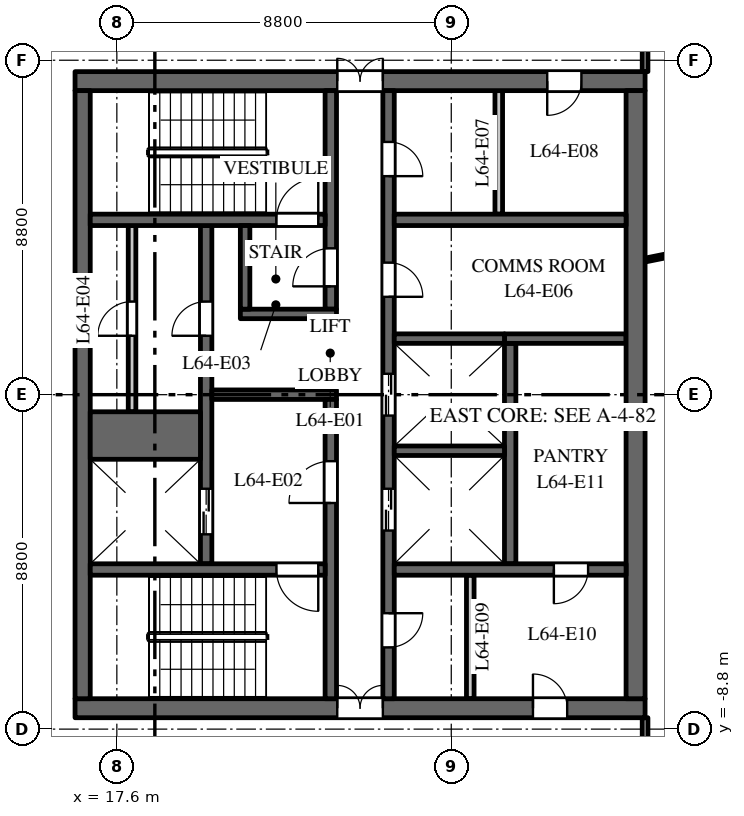
"""IFC4 building model, lengths in metres.
Left out: names, types, materials, properties, quantities, classifications, styles, units other than length and angle.
Written with IfcOpenShell. Run it as: python <this file> out.ifc"""

import sys

from ifc_helpers import new_model, si_unit, direction, frame, frame_2d, origin, place, context, subcontext, project, spatial, rectangle, extrude, element, fill, save


model = new_model("IFC4")
c1 = context("Model", 3, precision=1e-05, world=origin(), true_north=direction((0.0, 1.0)))
c2 = subcontext(c1, "Body", "Model", "MODEL_VIEW")
j1 = project(units=[si_unit("LENGTHUNIT", "METRE"), si_unit("PLANEANGLEUNIT", "RADIAN")], contexts=[c1])
p1 = place(None, origin())
s1 = spatial("IfcSite", under=j1, at=p1, CompositionType="ELEMENT")
p2 = place(p1, origin())
s2 = spatial("IfcBuilding", under=s1, at=p2, CompositionType="ELEMENT")
p3 = place(p2, frame((0.0, 0.0, 299.0)))
s3 = spatial("IfcBuildingStorey", under=s2, at=p3, CompositionType="ELEMENT", Elevation=299.0)
p4 = place(p3, frame((16.5, 8.25, 0.0), z_axis=(0.0, 0.0, 1.0), x_axis=(1.0, 0.0, 0.0)))
e1 = element("IfcWall", 1, at=p4, inside=s3, PredefinedType="SHEAR", context=c2, shape_type="SweptSolid", body=[
    extrude(rectangle(XDim=15.0, YDim=0.5, at=frame_2d((7.5, 0.0))), origin(), (0.0, 0.0, 1.0), 3.7),
])
p5 = place(p4, frame((6.9, 0.0, 0.0)))
e2 = element("IfcOpeningElement", 2, at=p5, cuts=e1, PredefinedType="OPENING", context=c2, shape_type="SweptSolid", body=[
    extrude(rectangle(XDim=1.2, YDim=2.1, at=frame_2d((0.6, 1.05))), frame((0.0, 0.26, 0.0), z_axis=(0.0, -1.0, 0.0), x_axis=(1.0, 0.0, 0.0)), (0.0, 0.0, 1.0), 0.52),
])
p6 = place(p4, frame((12.425, 0.0, 0.0)))
e3 = element("IfcOpeningElement", 3, at=p6, cuts=e1, PredefinedType="OPENING", context=c2, shape_type="SweptSolid", body=[
    extrude(rectangle(XDim=0.9, YDim=2.1, at=frame_2d((0.45, 1.05))), frame((0.0, 0.26, 0.0), z_axis=(0.0, -1.0, 0.0), x_axis=(1.0, 0.0, 0.0)), (0.0, 0.0, 1.0), 0.52),
])
p7 = place(p3, frame((16.5, -8.25, 0.0), z_axis=(0.0, 0.0, 1.0), x_axis=(1.0, 0.0, 0.0)))
e4 = element("IfcWall", 4, at=p7, inside=s3, PredefinedType="SHEAR", context=c2, shape_type="SweptSolid", body=[
    extrude(rectangle(XDim=15.0, YDim=0.5, at=frame_2d((7.5, 0.0))), origin(), (0.0, 0.0, 1.0), 3.7),
])
p8 = place(p7, frame((6.9, 0.0, 0.0)))
e5 = element("IfcOpeningElement", 5, at=p8, cuts=e4, PredefinedType="OPENING", context=c2, shape_type="SweptSolid", body=[
    extrude(rectangle(XDim=1.2, YDim=2.1, at=frame_2d((0.6, 1.05))), frame((0.0, 0.26, 0.0), z_axis=(0.0, -1.0, 0.0), x_axis=(1.0, 0.0, 0.0)), (0.0, 0.0, 1.0), 0.52),
])
p9 = place(p7, frame((12.05, 0.0, 0.0)))
e6 = element("IfcOpeningElement", 6, at=p9, cuts=e4, PredefinedType="OPENING", context=c2, shape_type="SweptSolid", body=[
    extrude(rectangle(XDim=0.9, YDim=2.1, at=frame_2d((0.45, 1.05))), frame((0.0, 0.26, 0.0), z_axis=(0.0, -1.0, 0.0), x_axis=(1.0, 0.0, 0.0)), (0.0, 0.0, 1.0), 0.52),
])
p10 = place(p3, frame((18.0, -0.45, 0.0), z_axis=(0.0, 0.0, 1.0), x_axis=(0.0, 1.0, 0.0)))
e7 = element("IfcWall", 7, at=p10, inside=s3, PredefinedType="PARTITIONING", context=c2, shape_type="SweptSolid", body=[
    extrude(rectangle(XDim=4.9, YDim=0.2, at=frame_2d((2.45, 0.0))), origin(), (0.0, 0.0, 1.0), 3.7),
])
p11 = place(p10, frame((2.0, 0.0, 0.0)))
e8 = element("IfcOpeningElement", 8, at=p11, cuts=e7, PredefinedType="OPENING", context=c2, shape_type="SweptSolid", body=[
    extrude(rectangle(XDim=0.9, YDim=2.1, at=frame_2d((0.45, 1.05))), frame((0.0, 0.11, 0.0), z_axis=(0.0, -1.0, 0.0), x_axis=(1.0, 0.0, 0.0)), (0.0, 0.0, 1.0), 0.22),
])
p12 = place(p3, frame((27.95, -4.45, 0.0), z_axis=(0.0, 0.0, 1.0), x_axis=(0.0, 1.0, 0.0)))
e9 = element("IfcWall", 9, at=p12, inside=s3, PredefinedType="SHEAR", context=c2, shape_type="SweptSolid", body=[
    extrude(rectangle(XDim=5.8, YDim=0.3, at=frame_2d((2.9, 0.0))), origin(), (0.0, 0.0, 1.0), 3.7),
])
p13 = place(p3, frame((27.8, 1.475, 0.0), z_axis=(0.0, 0.0, 1.0), x_axis=(1.0, 0.0, 0.0)))
e10 = element("IfcWall", 10, at=p13, inside=s3, PredefinedType="SHEAR", context=c2, shape_type="SweptSolid", body=[
    extrude(rectangle(XDim=3.2, YDim=0.25, at=frame_2d((1.6, 0.0))), origin(), (0.0, 0.0, 1.0), 3.7),
])
p14 = place(p3, frame((19.95, -4.45, 0.0), z_axis=(0.0, 0.0, 1.0), x_axis=(0.0, 1.0, 0.0)))
e11 = element("IfcWall", 11, at=p14, inside=s3, PredefinedType="SHEAR", context=c2, shape_type="SweptSolid", body=[
    extrude(rectangle(XDim=8.9, YDim=0.3, at=frame_2d((4.45, 0.0))), origin(), (0.0, 0.0, 1.0), 3.7),
])
p15 = place(p14, frame((0.775, 0.0, 0.0)))
e12 = element("IfcOpeningElement", 12, at=p15, cuts=e11, PredefinedType="OPENING", context=c2, shape_type="SweptSolid", body=[
    extrude(rectangle(XDim=1.2, YDim=2.1, at=frame_2d((0.6, 1.05))), frame((0.0, 0.16, 0.0), z_axis=(0.0, -1.0, 0.0), x_axis=(1.0, 0.0, 0.0)), (0.0, 0.0, 1.0), 0.32),
])
p16 = place(p14, frame((6.0, 0.0, 0.0)))
e13 = element("IfcOpeningElement", 13, at=p16, cuts=e11, PredefinedType="OPENING", context=c2, shape_type="SweptSolid", body=[
    extrude(rectangle(XDim=0.9, YDim=2.1, at=frame_2d((0.45, 1.05))), frame((0.0, 0.16, 0.0), z_axis=(0.0, -1.0, 0.0), x_axis=(1.0, 0.0, 0.0)), (0.0, 0.0, 1.0), 0.32),
])
p17 = place(p3, frame((24.75, -8.0, 0.0), z_axis=(0.0, 0.0, 1.0), x_axis=(0.0, 1.0, 0.0)))
e14 = element("IfcWall", 14, at=p17, inside=s3, PredefinedType="SHEAR", context=c2, shape_type="SweptSolid", body=[
    extrude(rectangle(XDim=16.0, YDim=0.3, at=frame_2d((8.0, 0.0))), origin(), (0.0, 0.0, 1.0), 3.7),
])
p18 = place(p17, frame((4.425, 0.0, 0.0)))
e15 = element("IfcOpeningElement", 15, at=p18, cuts=e14, PredefinedType="OPENING", context=c2, shape_type="SweptSolid", body=[
    extrude(rectangle(XDim=1.1, YDim=2.1, at=frame_2d((0.55, 1.05))), frame((0.0, 0.16, 0.0), z_axis=(0.0, -1.0, 0.0), x_axis=(1.0, 0.0, 0.0)), (0.0, 0.0, 1.0), 0.32),
])
p19 = place(p17, frame((7.45, 0.0, 0.0)))
e16 = element("IfcOpeningElement", 16, at=p19, cuts=e14, PredefinedType="OPENING", context=c2, shape_type="SweptSolid", body=[
    extrude(rectangle(XDim=1.1, YDim=2.1, at=frame_2d((0.55, 1.05))), frame((0.0, 0.16, 0.0), z_axis=(0.0, -1.0, 0.0), x_axis=(1.0, 0.0, 0.0)), (0.0, 0.0, 1.0), 0.32),
])
p20 = place(p17, frame((10.575, 0.0, 0.0)))
e17 = element("IfcOpeningElement", 17, at=p20, cuts=e14, PredefinedType="OPENING", context=c2, shape_type="SweptSolid", body=[
    extrude(rectangle(XDim=0.9, YDim=2.1, at=frame_2d((0.45, 1.05))), frame((0.0, 0.16, 0.0), z_axis=(0.0, -1.0, 0.0), x_axis=(1.0, 0.0, 0.0)), (0.0, 0.0, 1.0), 0.32),
])
p21 = place(p17, frame((13.75, 0.0, 0.0)))
e18 = element("IfcOpeningElement", 18, at=p21, cuts=e14, PredefinedType="OPENING", context=c2, shape_type="SweptSolid", body=[
    extrude(rectangle(XDim=0.9, YDim=2.1, at=frame_2d((0.45, 1.05))), frame((0.0, 0.16, 0.0), z_axis=(0.0, -1.0, 0.0), x_axis=(1.0, 0.0, 0.0)), (0.0, 0.0, 1.0), 0.32),
])
p22 = place(p17, frame((1.35, 0.0, 0.0)))
e19 = element("IfcOpeningElement", 19, at=p22, cuts=e14, PredefinedType="OPENING", context=c2, shape_type="SweptSolid", body=[
    extrude(rectangle(XDim=0.9, YDim=2.1, at=frame_2d((0.45, 1.05))), frame((0.0, 0.16, 0.0), z_axis=(0.0, -1.0, 0.0), x_axis=(1.0, 0.0, 0.0)), (0.0, 0.0, 1.0), 0.32),
])
p23 = place(p3, frame((20.1, 0.0, 0.0), z_axis=(0.0, 0.0, 1.0), x_axis=(1.0, 0.0, 0.0)))
e20 = element("IfcWall", 20, at=p23, inside=s3, PredefinedType="SHEAR", context=c2, shape_type="SweptSolid", body=[
    extrude(rectangle(XDim=3.28, YDim=0.25, at=frame_2d((1.64, 0.0))), origin(), (0.0, 0.0, 1.0), 3.7),
])
p24 = place(p3, frame((16.7, -8.0, 0.0), z_axis=(0.0, 0.0, 1.0), x_axis=(0.0, 1.0, 0.0)))
e21 = element("IfcWall", 21, at=p24, inside=s3, PredefinedType="SHEAR", context=c2, shape_type="SweptSolid", body=[
    extrude(rectangle(XDim=16.0, YDim=0.4, at=frame_2d((8.0, 0.0))), origin(), (0.0, 0.0, 1.0), 3.7),
])
p25 = place(p3, frame((31.25, -8.0, 0.0), z_axis=(0.0, 0.0, 1.0), x_axis=(0.0, 1.0, 0.0)))
e22 = element("IfcWall", 22, at=p25, inside=s3, PredefinedType="SHEAR", context=c2, shape_type="SweptSolid", body=[
    extrude(rectangle(XDim=16.0, YDim=0.5, at=frame_2d((8.0, 0.0))), origin(), (0.0, 0.0, 1.0), 3.7),
])
p26 = place(p3, frame((24.9, 4.6, 0.0), z_axis=(0.0, 0.0, 1.0), x_axis=(1.0, 0.0, 0.0)))
e23 = element("IfcWall", 23, at=p26, inside=s3, PredefinedType="SHEAR", context=c2, shape_type="SweptSolid", body=[
    extrude(rectangle(XDim=6.1, YDim=0.3, at=frame_2d((3.05, 0.0))), origin(), (0.0, 0.0, 1.0), 3.7),
])
for number, where, z_axis, x_axis in (
    (24, (27.65, 4.75, 0.0), (0.0, 0.0, 1.0), (0.0, 1.0, 0.0)),
    (25, (26.9, -8.0, 0.0), (0.0, 0.0, 1.0), (0.0, 1.0, 0.0)),
):
    element("IfcWall", number, at=place(p3, frame(where, z_axis=z_axis, x_axis=x_axis)), inside=s3, PredefinedType="PARTITIONING", context=c2, shape_type="SweptSolid", body=[
        extrude(rectangle(XDim=3.25, YDim=0.2, at=frame_2d((1.625, 0.0))), origin(), (0.0, 0.0, 1.0), 3.7),
    ])
p27 = place(p3, frame((24.9, -4.6, 0.0), z_axis=(0.0, 0.0, 1.0), x_axis=(1.0, 0.0, 0.0)))
e26 = element("IfcWall", 26, at=p27, inside=s3, PredefinedType="SHEAR", context=c2, shape_type="SweptSolid", body=[
    extrude(rectangle(XDim=6.1, YDim=0.3, at=frame_2d((3.05, 0.0))), origin(), (0.0, 0.0, 1.0), 3.7),
])
p28 = place(p27, frame((4.2, 0.0, 0.0)))
e27 = element("IfcOpeningElement", 27, at=p28, cuts=e26, PredefinedType="OPENING", context=c2, shape_type="SweptSolid", body=[
    extrude(rectangle(XDim=0.9, YDim=2.1, at=frame_2d((0.45, 1.05))), frame((0.0, 0.16, 0.0), z_axis=(0.0, -1.0, 0.0), x_axis=(1.0, 0.0, 0.0)), (0.0, 0.0, 1.0), 0.32),
])
p29 = place(p3, frame((16.9, -1.075, 0.0), z_axis=(0.0, 0.0, 1.0), x_axis=(1.0, 0.0, 0.0)))
e28 = element("IfcWall", 28, at=p29, inside=s3, PredefinedType="SHEAR", context=c2, shape_type="SweptSolid", body=[
    extrude(rectangle(XDim=2.9, YDim=1.25, at=frame_2d((1.45, 0.0))), origin(), (0.0, 0.0, 1.0), 3.7),
])
for number, where, z_axis, x_axis in (
    (29, (24.9, -1.475, 0.0), (0.0, 0.0, 1.0), (1.0, 0.0, 0.0)),
    (30, (24.9, 1.475, 0.0), (0.0, 0.0, 1.0), (1.0, 0.0, 0.0)),
):
    element("IfcWall", number, at=place(p3, frame(where, z_axis=z_axis, x_axis=x_axis)), inside=s3, PredefinedType="SHEAR", context=c2, shape_type="SweptSolid", body=[
        extrude(rectangle(XDim=2.9, YDim=0.25, at=frame_2d((1.45, 0.0))), origin(), (0.0, 0.0, 1.0), 3.7),
    ])
p30 = place(p3, frame((23.23, 2.25, 0.0), z_axis=(0.0, 0.0, 1.0), x_axis=(0.0, 1.0, 0.0)))
e31 = element("IfcWall", 31, at=p30, inside=s3, PredefinedType="SHEAR", context=c2, shape_type="SweptSolid", body=[
    extrude(rectangle(XDim=5.75, YDim=0.3, at=frame_2d((2.875, 0.0))), origin(), (0.0, 0.0, 1.0), 3.7),
])
p31 = place(p30, frame((0.6, 0.0, 0.0)))
e32 = element("IfcOpeningElement", 32, at=p31, cuts=e31, PredefinedType="OPENING", context=c2, shape_type="SweptSolid", body=[
    extrude(rectangle(XDim=1.0, YDim=2.1, at=frame_2d((0.5, 1.05))), frame((0.0, 0.16, 0.0), z_axis=(0.0, -1.0, 0.0), x_axis=(1.0, 0.0, 0.0)), (0.0, 0.0, 1.0), 0.32),
])
p32 = place(p3, frame((23.23, -8.0, 0.0), z_axis=(0.0, 0.0, 1.0), x_axis=(0.0, 1.0, 0.0)))
e33 = element("IfcWall", 33, at=p32, inside=s3, PredefinedType="SHEAR", context=c2, shape_type="SweptSolid", body=[
    extrude(rectangle(XDim=7.875, YDim=0.3, at=frame_2d((3.938, 0.0))), origin(), (0.0, 0.0, 1.0), 3.7),
])
p33 = place(p32, frame((5.15, 0.0, 0.0)))
e34 = element("IfcOpeningElement", 34, at=p33, cuts=e33, PredefinedType="OPENING", context=c2, shape_type="SweptSolid", body=[
    extrude(rectangle(XDim=1.1, YDim=2.1, at=frame_2d((0.55, 1.05))), frame((0.0, 0.16, 0.0), z_axis=(0.0, -1.0, 0.0), x_axis=(1.0, 0.0, 0.0)), (0.0, 0.0, 1.0), 0.32),
])
p34 = place(p3, frame((16.9, 4.6, 0.0), z_axis=(0.0, 0.0, 1.0), x_axis=(1.0, 0.0, 0.0)))
e35 = element("IfcWall", 35, at=p34, inside=s3, PredefinedType="SHEAR", context=c2, shape_type="SweptSolid", body=[
    extrude(rectangle(XDim=6.18, YDim=0.3, at=frame_2d((3.09, 0.0))), origin(), (0.0, 0.0, 1.0), 3.7),
])
p35 = place(p34, frame((4.9, 0.0, 0.0)))
e36 = element("IfcOpeningElement", 36, at=p35, cuts=e35, PredefinedType="OPENING", context=c2, shape_type="SweptSolid", body=[
    extrude(rectangle(XDim=1.1, YDim=2.1, at=frame_2d((0.55, 1.05))), frame((0.0, 0.16, 0.0), z_axis=(0.0, -1.0, 0.0), x_axis=(1.0, 0.0, 0.0)), (0.0, 0.0, 1.0), 0.32),
])
p36 = place(p3, frame((16.9, -4.6, 0.0), z_axis=(0.0, 0.0, 1.0), x_axis=(1.0, 0.0, 0.0)))
e37 = element("IfcWall", 37, at=p36, inside=s3, PredefinedType="SHEAR", context=c2, shape_type="SweptSolid", body=[
    extrude(rectangle(XDim=6.18, YDim=0.3, at=frame_2d((3.09, 0.0))), origin(), (0.0, 0.0, 1.0), 3.7),
])
p37 = place(p36, frame((4.9, 0.0, 0.0)))
e38 = element("IfcOpeningElement", 38, at=p37, cuts=e37, PredefinedType="OPENING", context=c2, shape_type="SweptSolid", body=[
    extrude(rectangle(XDim=1.1, YDim=2.1, at=frame_2d((0.55, 1.05))), frame((0.0, 0.16, 0.0), z_axis=(0.0, -1.0, 0.0), x_axis=(1.0, 0.0, 0.0)), (0.0, 0.0, 1.0), 0.32),
])
p38 = place(p3, frame((20.85, 2.125, 0.0), z_axis=(0.0, 0.0, 1.0), x_axis=(1.0, 0.0, 0.0)))
e39 = element("IfcWall", 39, at=p38, inside=s3, PredefinedType="SHEAR", context=c2, shape_type="SweptSolid", body=[
    extrude(rectangle(XDim=2.53, YDim=0.25, at=frame_2d((1.265, 0.0))), origin(), (0.0, 0.0, 1.0), 3.7),
])
p39 = place(p3, frame((20.975, 2.25, 0.0), z_axis=(0.0, 0.0, 1.0), x_axis=(0.0, 1.0, 0.0)))
e40 = element("IfcWall", 40, at=p39, inside=s3, PredefinedType="SHEAR", context=c2, shape_type="SweptSolid", body=[
    extrude(rectangle(XDim=2.2, YDim=0.25, at=frame_2d((1.1, 0.0))), origin(), (0.0, 0.0, 1.0), 3.7),
])
p40 = place(p3, frame((31.5, -11.5, 0.0), z_axis=(0.0, 0.0, 1.0), x_axis=(0.0, 1.0, 0.0)))
e41 = element("IfcWall", 41, at=p40, inside=s3, PredefinedType="PARTITIONING", context=c2, shape_type="SweptSolid", body=[
    extrude(rectangle(XDim=3.0, YDim=0.15, at=frame_2d((1.5, 0.0))), origin(), (0.0, 0.0, 1.0), 3.0),
])
p41 = place(p40, frame((1.4, 0.0, 0.0)))
e42 = element("IfcOpeningElement", 42, at=p41, cuts=e41, PredefinedType="OPENING", context=c2, shape_type="SweptSolid", body=[
    extrude(rectangle(XDim=1.0, YDim=2.1, at=frame_2d((0.5, 1.05))), frame((0.0, 0.085, 0.0), z_axis=(0.0, -1.0, 0.0), x_axis=(1.0, 0.0, 0.0)), (0.0, 0.0, 1.0), 0.17),
])
p42 = place(p3, frame((31.5, 3.542, 0.0), z_axis=(0.0, 0.0, 1.0), x_axis=(0.980357474535, 0.197228857227, 0.0)))
e43 = element("IfcWall", 43, at=p42, inside=s3, PredefinedType="PARTITIONING", context=c2, shape_type="SweptSolid", body=[
    extrude(rectangle(XDim=4.092, YDim=0.1, at=frame_2d((2.046, 0.0))), origin(), (0.0, 0.0, 1.0), 3.0),
])
p43 = place(p3, frame((31.5, 8.5, 0.0), z_axis=(0.0, 0.0, 1.0), x_axis=(0.0, 1.0, 0.0)))
e44 = element("IfcWall", 44, at=p43, inside=s3, PredefinedType="PARTITIONING", context=c2, shape_type="SweptSolid", body=[
    extrude(rectangle(XDim=3.0, YDim=0.15, at=frame_2d((1.5, 0.0))), origin(), (0.0, 0.0, 1.0), 3.0),
])
p44 = place(p15, origin())
e45 = element("IfcDoor", 45, at=p44, inside=s3, OperationType="DOUBLE_DOOR_SLIDING", PredefinedType="DOOR", context=c2, shape_type="SweptSolid", body=[
    extrude(rectangle(XDim=1.2, YDim=2.1, at=frame_2d((0.6, 1.05))), frame((0.0, 0.025, 0.0), z_axis=(0.0, -1.0, 0.0), x_axis=(1.0, 0.0, 0.0)), (0.0, 0.0, 1.0), 0.05),
])
fill(e12, e45)
p45 = place(p18, origin())
e46 = element("IfcDoor", 46, at=p45, inside=s3, OperationType="DOUBLE_DOOR_SLIDING", PredefinedType="DOOR", context=c2, shape_type="SweptSolid", body=[
    extrude(rectangle(XDim=1.1, YDim=2.1, at=frame_2d((0.55, 1.05))), frame((0.0, 0.025, 0.0), z_axis=(0.0, -1.0, 0.0), x_axis=(1.0, 0.0, 0.0)), (0.0, 0.0, 1.0), 0.05),
])
fill(e15, e46)
p46 = place(p19, origin())
e47 = element("IfcDoor", 47, at=p46, inside=s3, OperationType="DOUBLE_DOOR_SLIDING", PredefinedType="DOOR", context=c2, shape_type="SweptSolid", body=[
    extrude(rectangle(XDim=1.1, YDim=2.1, at=frame_2d((0.55, 1.05))), frame((0.0, 0.025, 0.0), z_axis=(0.0, -1.0, 0.0), x_axis=(1.0, 0.0, 0.0)), (0.0, 0.0, 1.0), 0.05),
])
fill(e16, e47)
p47 = place(p35, origin())
e48 = element("IfcDoor", 48, at=p47, inside=s3, OperationType="SINGLE_SWING_LEFT", PredefinedType="DOOR", context=c2, shape_type="SweptSolid", body=[
    extrude(rectangle(XDim=1.1, YDim=2.1, at=frame_2d((0.55, 1.05))), frame((0.0, 0.025, 0.0), z_axis=(0.0, -1.0, 0.0), x_axis=(1.0, 0.0, 0.0)), (0.0, 0.0, 1.0), 0.05),
])
fill(e36, e48)
p48 = place(p37, origin())
e49 = element("IfcDoor", 49, at=p48, inside=s3, OperationType="SINGLE_SWING_RIGHT", PredefinedType="DOOR", context=c2, shape_type="SweptSolid", body=[
    extrude(rectangle(XDim=1.1, YDim=2.1, at=frame_2d((0.55, 1.05))), frame((0.0, 0.025, 0.0), z_axis=(0.0, -1.0, 0.0), x_axis=(1.0, 0.0, 0.0)), (0.0, 0.0, 1.0), 0.05),
])
fill(e38, e49)
p49 = place(p33, origin())
e50 = element("IfcDoor", 50, at=p49, inside=s3, OperationType="SINGLE_SWING_RIGHT", PredefinedType="DOOR", context=c2, shape_type="SweptSolid", body=[
    extrude(rectangle(XDim=1.1, YDim=2.1, at=frame_2d((0.55, 1.05))), frame((0.0, 0.025, 0.0), z_axis=(0.0, -1.0, 0.0), x_axis=(1.0, 0.0, 0.0)), (0.0, 0.0, 1.0), 0.05),
])
fill(e34, e50)
p50 = place(p31, origin())
e51 = element("IfcDoor", 51, at=p50, inside=s3, OperationType="SINGLE_SWING_RIGHT", PredefinedType="DOOR", context=c2, shape_type="SweptSolid", body=[
    extrude(rectangle(XDim=1.0, YDim=2.1, at=frame_2d((0.5, 1.05))), frame((0.0, 0.025, 0.0), z_axis=(0.0, -1.0, 0.0), x_axis=(1.0, 0.0, 0.0)), (0.0, 0.0, 1.0), 0.05),
])
fill(e32, e51)
p51 = place(p5, origin())
e52 = element("IfcDoor", 52, at=p51, inside=s3, OperationType="DOUBLE_DOOR_DOUBLE_SWING", PredefinedType="DOOR", context=c2, shape_type="SweptSolid", body=[
    extrude(rectangle(XDim=1.2, YDim=2.1, at=frame_2d((0.6, 1.05))), frame((0.0, 0.025, 0.0), z_axis=(0.0, -1.0, 0.0), x_axis=(1.0, 0.0, 0.0)), (0.0, 0.0, 1.0), 0.05),
])
fill(e2, e52)
p52 = place(p8, origin())
e53 = element("IfcDoor", 53, at=p52, inside=s3, OperationType="DOUBLE_DOOR_DOUBLE_SWING", PredefinedType="DOOR", context=c2, shape_type="SweptSolid", body=[
    extrude(rectangle(XDim=1.2, YDim=2.1, at=frame_2d((0.6, 1.05))), frame((0.0, 0.025, 0.0), z_axis=(0.0, -1.0, 0.0), x_axis=(1.0, 0.0, 0.0)), (0.0, 0.0, 1.0), 0.05),
])
fill(e5, e53)
p53 = place(p16, origin())
e54 = element("IfcDoor", 54, at=p53, inside=s3, OperationType="SINGLE_SWING_RIGHT", PredefinedType="DOOR", context=c2, shape_type="SweptSolid", body=[
    extrude(rectangle(XDim=0.9, YDim=2.1, at=frame_2d((0.45, 1.05))), frame((0.0, 0.025, 0.0), z_axis=(0.0, -1.0, 0.0), x_axis=(1.0, 0.0, 0.0)), (0.0, 0.0, 1.0), 0.05),
])
fill(e13, e54)
p54 = place(p11, origin())
e55 = element("IfcDoor", 55, at=p54, inside=s3, OperationType="SINGLE_SWING_RIGHT", PredefinedType="DOOR", context=c2, shape_type="SweptSolid", body=[
    extrude(rectangle(XDim=0.9, YDim=2.1, at=frame_2d((0.45, 1.05))), frame((0.0, 0.025, 0.0), z_axis=(0.0, -1.0, 0.0), x_axis=(1.0, 0.0, 0.0)), (0.0, 0.0, 1.0), 0.05),
])
fill(e8, e55)
p55 = place(p20, origin())
e56 = element("IfcDoor", 56, at=p55, inside=s3, OperationType="SINGLE_SWING_LEFT", PredefinedType="DOOR", context=c2, shape_type="SweptSolid", body=[
    extrude(rectangle(XDim=0.9, YDim=2.1, at=frame_2d((0.45, 1.05))), frame((0.0, 0.025, 0.0), z_axis=(0.0, -1.0, 0.0), x_axis=(1.0, 0.0, 0.0)), (0.0, 0.0, 1.0), 0.05),
])
fill(e17, e56)
p56 = place(p21, origin())
e57 = element("IfcDoor", 57, at=p56, inside=s3, OperationType="SINGLE_SWING_LEFT", PredefinedType="DOOR", context=c2, shape_type="SweptSolid", body=[
    extrude(rectangle(XDim=0.9, YDim=2.1, at=frame_2d((0.45, 1.05))), frame((0.0, 0.025, 0.0), z_axis=(0.0, -1.0, 0.0), x_axis=(1.0, 0.0, 0.0)), (0.0, 0.0, 1.0), 0.05),
])
fill(e18, e57)
p57 = place(p6, origin())
e58 = element("IfcDoor", 58, at=p57, inside=s3, OperationType="SINGLE_SWING_LEFT", PredefinedType="DOOR", context=c2, shape_type="SweptSolid", body=[
    extrude(rectangle(XDim=0.9, YDim=2.1, at=frame_2d((0.45, 1.05))), frame((0.0, 0.025, 0.0), z_axis=(0.0, -1.0, 0.0), x_axis=(1.0, 0.0, 0.0)), (0.0, 0.0, 1.0), 0.05),
])
fill(e3, e58)
p58 = place(p22, origin())
e59 = element("IfcDoor", 59, at=p58, inside=s3, OperationType="SINGLE_SWING_RIGHT", PredefinedType="DOOR", context=c2, shape_type="SweptSolid", body=[
    extrude(rectangle(XDim=0.9, YDim=2.1, at=frame_2d((0.45, 1.05))), frame((0.0, 0.025, 0.0), z_axis=(0.0, -1.0, 0.0), x_axis=(1.0, 0.0, 0.0)), (0.0, 0.0, 1.0), 0.05),
])
fill(e19, e59)
p59 = place(p9, origin())
e60 = element("IfcDoor", 60, at=p59, inside=s3, OperationType="SINGLE_SWING_RIGHT", PredefinedType="DOOR", context=c2, shape_type="SweptSolid", body=[
    extrude(rectangle(XDim=0.9, YDim=2.1, at=frame_2d((0.45, 1.05))), frame((0.0, 0.025, 0.0), z_axis=(0.0, -1.0, 0.0), x_axis=(1.0, 0.0, 0.0)), (0.0, 0.0, 1.0), 0.05),
])
fill(e6, e60)
p60 = place(p28, origin())
e61 = element("IfcDoor", 61, at=p60, inside=s3, OperationType="SINGLE_SWING_LEFT", PredefinedType="DOOR", context=c2, shape_type="SweptSolid", body=[
    extrude(rectangle(XDim=0.9, YDim=2.1, at=frame_2d((0.45, 1.05))), frame((0.0, 0.025, 0.0), z_axis=(0.0, -1.0, 0.0), x_axis=(1.0, 0.0, 0.0)), (0.0, 0.0, 1.0), 0.05),
])
fill(e27, e61)
save(model, sys.argv[1])
